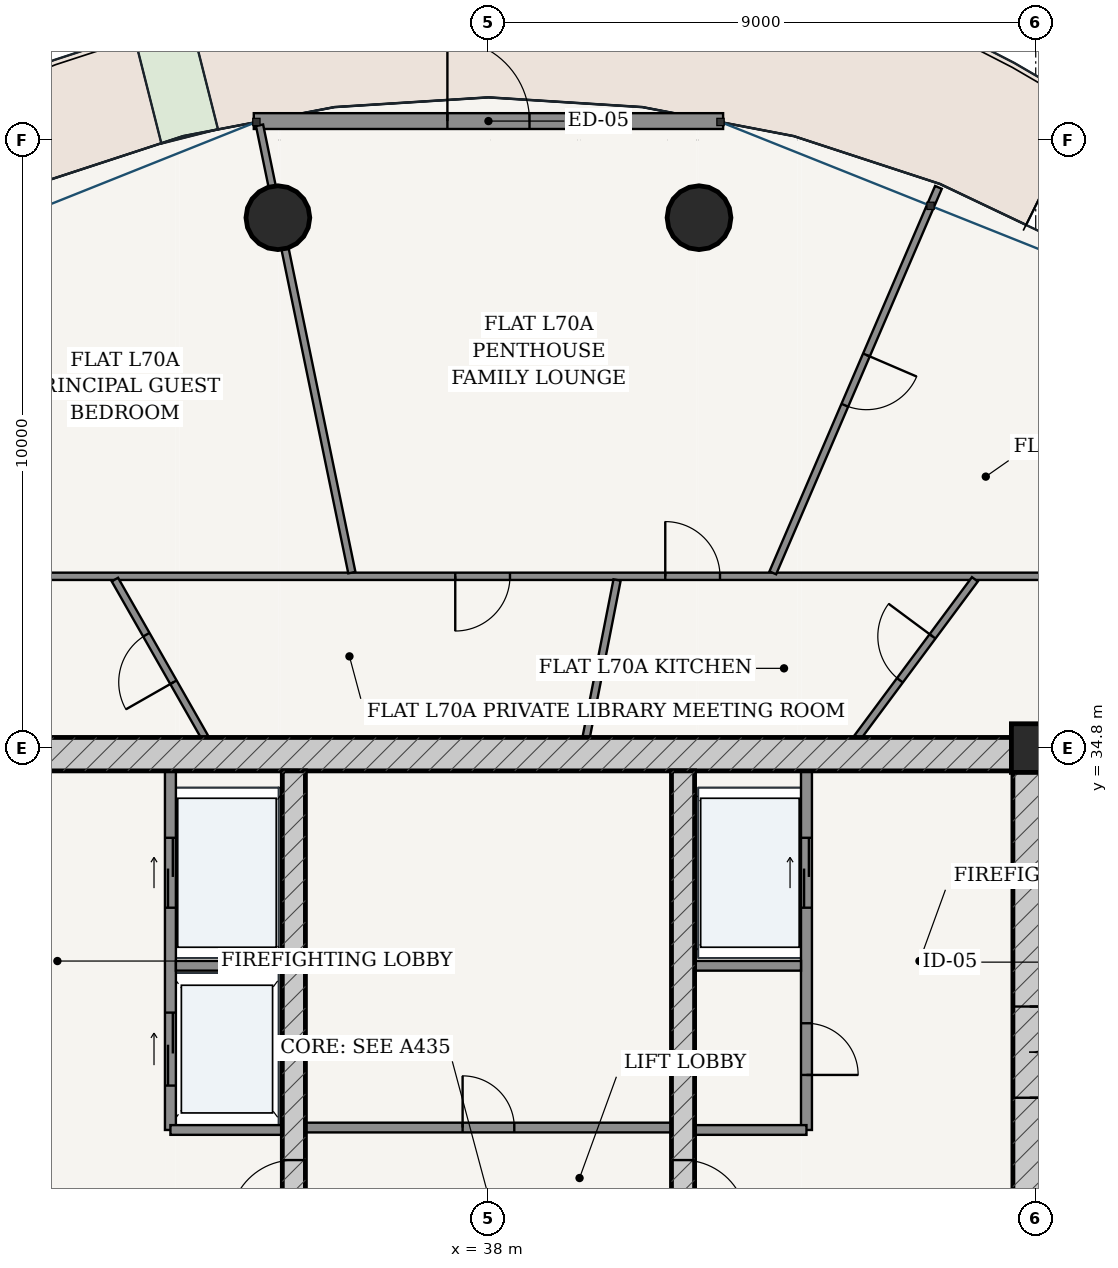
"""IFC4 building model, lengths in metres.
Left out: names, types, materials, properties, quantities, classifications, styles, units other than length and angle.
Written with IfcOpenShell. Run it as: python <this file> out.ifc"""

import sys

from ifc_helpers import new_model, si_unit, direction, frame, frame_2d, origin, origin_2d, place, context, subcontext, project, spatial, rectangle, hollow_circle, extrude, source, transform, mapped, element, fill, save


model = new_model("IFC4")
c1 = context("Model", 3, precision=1e-05, world=origin(), true_north=direction((-0.2419218956, 0.970295726276)))
c2 = subcontext(c1, "Body", "Model", "MODEL_VIEW")
j1 = project(units=[si_unit("LENGTHUNIT", "METRE"), si_unit("PLANEANGLEUNIT", "RADIAN")], contexts=[c1])
p1 = place(None, origin())
s1 = spatial("IfcSite", under=j1, at=p1, CompositionType="ELEMENT")
p2 = place(p1, origin())
s2 = spatial("IfcBuilding", under=s1, at=p2, CompositionType="ELEMENT")
p3 = place(p2, frame((0.0, 0.0, 266.95)))
s3 = spatial("IfcBuildingStorey", under=s2, at=p3, CompositionType="ELEMENT", Elevation=266.95)
p4 = place(p3, frame((47.0, 34.8, 0.0), z_axis=(0.0, 0.0, 1.0), x_axis=(1.0, 0.0, 0.0)))
e1 = element("IfcColumn", 1, at=p4, inside=s3, PredefinedType="COLUMN", context=c2, shape_type="SweptSolid", body=[
    extrude(rectangle(XDim=0.8, YDim=0.8, at=origin_2d()), origin(), (0.0, 0.0, 1.0), 3.75),
])
p5 = place(p3, frame((28.825, 34.7, 0.0), z_axis=(0.0, 0.0, 1.0), x_axis=(1.0, 0.0, 0.0)))
e2 = element("IfcWall", 2, at=p5, inside=s3, PredefinedType="SHEAR", context=c2, shape_type="SweptSolid", body=[
    extrude(rectangle(XDim=18.35, YDim=0.55, at=frame_2d((9.175, 0.0))), origin(), (0.0, 0.0, 1.0), 3.49),
])
p6 = place(p3, frame((46.9, 19.175, 0.0), z_axis=(0.0, 0.0, 1.0), x_axis=(0.0, 1.0, 0.0)))
e3 = element("IfcWall", 3, at=p6, inside=s3, PredefinedType="SHEAR", context=c2, shape_type="SweptSolid", body=[
    extrude(rectangle(XDim=15.25, YDim=0.55, at=frame_2d((7.625, 0.0))), origin(), (0.0, 0.0, 1.0), 3.49),
])
p7 = place(p6, frame((9.875, 0.0, 0.0)))
e4 = element("IfcOpeningElement", 4, at=p7, cuts=e3, PredefinedType="OPENING", context=c2, shape_type="SweptSolid", body=[
    extrude(rectangle(XDim=1.5, YDim=2.2, at=frame_2d((0.75, 1.1))), frame((0.0, 0.285, 0.0), z_axis=(0.0, -1.0, 0.0), x_axis=(1.0, 0.0, 0.0)), (0.0, 0.0, 1.0), 0.57),
])
p8 = place(p3, frame((34.8, 19.175, 0.0), z_axis=(0.0, 0.0, 1.0), x_axis=(0.0, 1.0, 0.0)))
e5 = element("IfcWall", 5, at=p8, inside=s3, PredefinedType="SHEAR", context=c2, shape_type="SweptSolid", body=[
    extrude(rectangle(XDim=15.25, YDim=0.38, at=frame_2d((7.625, 0.0))), origin(), (0.0, 0.0, 1.0), 3.49),
])
p9 = place(p8, frame((7.8, 0.0, 0.0)))
e6 = element("IfcOpeningElement", 6, at=p9, cuts=e5, PredefinedType="OPENING", context=c2, shape_type="SweptSolid", body=[
    extrude(rectangle(XDim=1.05, YDim=2.15, at=frame_2d((0.525, 1.075))), frame((0.0, 0.2, 0.0), z_axis=(0.0, -1.0, 0.0), x_axis=(1.0, 0.0, 0.0)), (0.0, 0.0, 1.0), 0.4),
])
p10 = place(p3, frame((41.2, 19.175, 0.0), z_axis=(0.0, 0.0, 1.0), x_axis=(0.0, 1.0, 0.0)))
e7 = element("IfcWall", 7, at=p10, inside=s3, PredefinedType="SHEAR", context=c2, shape_type="SweptSolid", body=[
    extrude(rectangle(XDim=15.25, YDim=0.38, at=frame_2d((7.625, 0.0))), origin(), (0.0, 0.0, 1.0), 3.49),
])
p11 = place(p10, frame((7.8, 0.0, 0.0)))
e8 = element("IfcOpeningElement", 8, at=p11, cuts=e7, PredefinedType="OPENING", context=c2, shape_type="SweptSolid", body=[
    extrude(rectangle(XDim=1.05, YDim=2.15, at=frame_2d((0.525, 1.075))), frame((0.0, 0.2, 0.0), z_axis=(0.0, -1.0, 0.0), x_axis=(1.0, 0.0, 0.0)), (0.0, 0.0, 1.0), 0.4),
])
for number, where, z_axis, x_axis in (
    (9, (41.463, 43.522, 0.0), (0.0, 0.0, 1.0), (1.0, 0.0, 0.0)),
    (10, (34.537, 43.522, 0.0), (0.0, 0.0, 1.0), (1.0, 0.0, 0.0)),
):
    element("IfcColumn", number, at=place(p3, frame(where, z_axis=z_axis, x_axis=x_axis)), inside=s3, PredefinedType="COLUMN", context=c2, shape_type="SweptSolid", body=[
        extrude(hollow_circle(Radius=0.525, WallThickness=0.035, at=origin_2d()), origin(), (0.0, 0.0, 1.0), 3.75),
    ])
p12 = place(p3, frame((41.859, 45.111, 0.0), z_axis=(0.0, 0.0, 1.0), x_axis=(-1.0, 0.0, 0.0)))
e11 = element("IfcWall", 11, at=p12, inside=s3, PredefinedType="SOLIDWALL", context=c2, shape_type="SweptSolid", body=[
    extrude(rectangle(XDim=7.718, YDim=0.26, at=frame_2d((3.859, 0.0))), origin(), (0.0, 0.0, 1.0), 3.49),
])
p13 = place(p12, frame((3.184, 0.0, 0.0)))
e12 = element("IfcOpeningElement", 12, at=p13, cuts=e11, PredefinedType="OPENING", context=c2, shape_type="SweptSolid", body=[
    extrude(rectangle(XDim=1.35, YDim=2.2, at=frame_2d((0.675, 1.1))), frame((0.0, 0.14, 0.0), z_axis=(0.0, -1.0, 0.0), x_axis=(1.0, 0.0, 0.0)), (0.0, 0.0, 1.0), 0.28),
])
p14 = place(p3, frame((32.77, 28.52, 0.0), z_axis=(0.0, 0.0, 1.0), x_axis=(0.0, 1.0, 0.0)))
e13 = element("IfcWall", 13, at=p14, inside=s3, PredefinedType="PARTITIONING", context=c2, shape_type="SweptSolid", body=[
    extrude(rectangle(XDim=5.905, YDim=0.18, at=frame_2d((2.953, 0.0))), origin(), (0.0, 0.0, 1.0), 3.49),
])
p15 = place(p14, frame((3.655, 0.0, 0.0)))
e14 = element("IfcOpeningElement", 14, at=p15, cuts=e13, PredefinedType="OPENING", context=c2, shape_type="SweptSolid", body=[
    extrude(rectangle(XDim=1.15, YDim=2.2, at=frame_2d((0.575, 1.1))), frame((0.0, 0.1, 0.0), z_axis=(0.0, -1.0, 0.0), x_axis=(1.0, 0.0, 0.0)), (0.0, 0.0, 1.0), 0.2),
])
p16 = place(p14, frame((0.73, 0.0, 0.0)))
e15 = element("IfcOpeningElement", 15, at=p16, cuts=e13, PredefinedType="OPENING", context=c2, shape_type="SweptSolid", body=[
    extrude(rectangle(XDim=1.2, YDim=2.25, at=frame_2d((0.6, 1.125))), frame((0.0, 0.1, 0.0), z_axis=(0.0, -1.0, 0.0), x_axis=(1.0, 0.0, 0.0)), (0.0, 0.0, 1.0), 0.2),
])
p17 = place(p3, frame((32.86, 31.22, 0.0), z_axis=(0.0, 0.0, 1.0), x_axis=(1.0, 0.0, 0.0)))
e16 = element("IfcWall", 16, at=p17, inside=s3, PredefinedType="PARTITIONING", context=c2, shape_type="SweptSolid", body=[
    extrude(rectangle(XDim=1.75, YDim=0.16, at=frame_2d((0.875, 0.0))), origin(), (0.0, 0.0, 1.0), 3.49),
])
p18 = place(p3, frame((32.77, 28.52, 0.0), z_axis=(0.0, 0.0, 1.0), x_axis=(1.0, 0.0, 0.0)))
e17 = element("IfcWall", 17, at=p18, inside=s3, PredefinedType="PARTITIONING", context=c2, shape_type="SweptSolid", body=[
    extrude(rectangle(XDim=1.84, YDim=0.16, at=frame_2d((0.92, 0.0))), origin(), (0.0, 0.0, 1.0), 3.49),
])
p19 = place(p3, frame((43.23, 28.52, 0.0), z_axis=(0.0, 0.0, 1.0), x_axis=(0.0, 1.0, 0.0)))
e18 = element("IfcWall", 18, at=p19, inside=s3, PredefinedType="PARTITIONING", context=c2, shape_type="SweptSolid", body=[
    extrude(rectangle(XDim=5.905, YDim=0.18, at=frame_2d((2.953, 0.0))), origin(), (0.0, 0.0, 1.0), 3.49),
])
p20 = place(p19, frame((0.905, 0.0, 0.0)))
e19 = element("IfcOpeningElement", 19, at=p20, cuts=e18, PredefinedType="OPENING", context=c2, shape_type="SweptSolid", body=[
    extrude(rectangle(XDim=0.85, YDim=2.1, at=frame_2d((0.425, 1.05))), frame((0.0, 0.1, 0.0), z_axis=(0.0, -1.0, 0.0), x_axis=(1.0, 0.0, 0.0)), (0.0, 0.0, 1.0), 0.2),
])
p21 = place(p19, frame((3.655, 0.0, 0.0)))
e20 = element("IfcOpeningElement", 20, at=p21, cuts=e18, PredefinedType="OPENING", context=c2, shape_type="SweptSolid", body=[
    extrude(rectangle(XDim=1.15, YDim=2.2, at=frame_2d((0.575, 1.1))), frame((0.0, 0.1, 0.0), z_axis=(0.0, -1.0, 0.0), x_axis=(1.0, 0.0, 0.0)), (0.0, 0.0, 1.0), 0.2),
])
p22 = place(p3, frame((41.39, 31.22, 0.0), z_axis=(0.0, 0.0, 1.0), x_axis=(1.0, 0.0, 0.0)))
e21 = element("IfcWall", 21, at=p22, inside=s3, PredefinedType="PARTITIONING", context=c2, shape_type="SweptSolid", body=[
    extrude(rectangle(XDim=1.75, YDim=0.16, at=frame_2d((0.875, 0.0))), origin(), (0.0, 0.0, 1.0), 3.49),
])
p23 = place(p3, frame((41.39, 28.52, 0.0), z_axis=(0.0, 0.0, 1.0), x_axis=(1.0, 0.0, 0.0)))
e22 = element("IfcWall", 22, at=p23, inside=s3, PredefinedType="PARTITIONING", context=c2, shape_type="SweptSolid", body=[
    extrude(rectangle(XDim=1.84, YDim=0.16, at=frame_2d((0.92, 0.0))), origin(), (0.0, 0.0, 1.0), 3.49),
])
p24 = place(p3, frame((34.99, 28.56, 0.0), z_axis=(0.0, 0.0, 1.0), x_axis=(1.0, 0.0, 0.0)))
e23 = element("IfcWall", 23, at=p24, inside=s3, PredefinedType="PARTITIONING", context=c2, shape_type="SweptSolid", body=[
    extrude(rectangle(XDim=6.02, YDim=0.16, at=frame_2d((3.01, 0.0))), origin(), (0.0, 0.0, 1.0), 3.49),
])
p25 = place(p24, frame((2.585, 0.0, 0.0)))
e24 = element("IfcOpeningElement", 24, at=p25, cuts=e23, PredefinedType="OPENING", context=c2, shape_type="SweptSolid", body=[
    extrude(rectangle(XDim=0.85, YDim=2.1, at=frame_2d((0.425, 1.05))), frame((0.0, 0.09, 0.0), z_axis=(0.0, -1.0, 0.0), x_axis=(1.0, 0.0, 0.0)), (0.0, 0.0, 1.0), 0.18),
])
p26 = place(p3, frame((26.175, 37.625, 0.0), z_axis=(0.0, 0.0, 1.0), x_axis=(1.0, 0.0, 0.0)))
e25 = element("IfcWall", 25, at=p26, inside=s3, PredefinedType="PARTITIONING", context=c2, shape_type="SweptSolid", body=[
    extrude(rectangle(XDim=23.65, YDim=0.12, at=frame_2d((11.825, 0.0))), origin(), (0.0, 0.0, 1.0), 3.015),
])
p27 = place(p26, frame((14.733, 0.0, 0.0)))
e26 = element("IfcOpeningElement", 26, at=p27, cuts=e25, PredefinedType="OPENING", context=c2, shape_type="SweptSolid", body=[
    extrude(rectangle(XDim=0.9, YDim=2.15, at=frame_2d((0.45, 1.075))), frame((0.0, 0.07, 0.0), z_axis=(0.0, -1.0, 0.0), x_axis=(1.0, 0.0, 0.0)), (0.0, 0.0, 1.0), 0.14),
])
p28 = place(p26, frame((11.279, 0.0, 0.0)))
e27 = element("IfcOpeningElement", 27, at=p28, cuts=e25, PredefinedType="OPENING", context=c2, shape_type="SweptSolid", body=[
    extrude(rectangle(XDim=0.9, YDim=2.15, at=frame_2d((0.45, 1.075))), frame((0.0, 0.07, 0.0), z_axis=(0.0, -1.0, 0.0), x_axis=(1.0, 0.0, 0.0)), (0.0, 0.0, 1.0), 0.14),
])
p29 = place(p26, frame((2.678, 0.0, 0.0)))
e28 = element("IfcOpeningElement", 28, at=p29, cuts=e25, PredefinedType="OPENING", context=c2, shape_type="SweptSolid", body=[
    extrude(rectangle(XDim=0.9, YDim=2.15, at=frame_2d((0.45, 1.075))), frame((0.0, 0.07, 0.0), z_axis=(0.0, -1.0, 0.0), x_axis=(1.0, 0.0, 0.0)), (0.0, 0.0, 1.0), 0.14),
])
p30 = place(p3, frame((42.676, 37.682, 0.0), z_axis=(0.0, 0.0, 1.0), x_axis=(0.394777489933, 0.918776759307, 0.0)))
e29 = element("IfcWall", 29, at=p30, inside=s3, PredefinedType="PARTITIONING", context=c2, shape_type="SweptSolid", body=[
    extrude(rectangle(XDim=6.9, YDim=0.12, at=frame_2d((3.45, 0.0))), origin(), (0.0, 0.0, 1.0), 3.121),
])
p31 = place(p30, frame((3.0, 0.0, 0.0)))
e30 = element("IfcOpeningElement", 30, at=p31, cuts=e29, PredefinedType="OPENING", context=c2, shape_type="SweptSolid", body=[
    extrude(rectangle(XDim=0.9, YDim=2.15, at=frame_2d((0.45, 1.075))), frame((0.0, 0.07, 0.0), z_axis=(0.0, -1.0, 0.0), x_axis=(1.0, 0.0, 0.0)), (0.0, 0.0, 1.0), 0.14),
])
p32 = place(p3, frame((35.754, 37.686, 0.0), z_axis=(0.0, 0.0, 1.0), x_axis=(-0.202105877204, 0.979363678313, 0.0)))
e31 = element("IfcWall", 31, at=p32, inside=s3, PredefinedType="PARTITIONING", context=c2, shape_type="SweptSolid", body=[
    extrude(rectangle(XDim=7.512, YDim=0.12, at=frame_2d((3.756, 0.0))), origin(), (0.0, 0.0, 1.0), 3.015),
])
p33 = place(p3, frame((44.07, 34.977, 0.0), z_axis=(0.0, 0.0, 1.0), x_axis=(0.596033679783, 0.802959433947, 0.0)))
e32 = element("IfcWall", 32, at=p33, inside=s3, PredefinedType="PARTITIONING", context=c2, shape_type="SweptSolid", body=[
    extrude(rectangle(XDim=3.236, YDim=0.12, at=frame_2d((1.618, 0.0))), origin(), (0.0, 0.0, 1.0), 3.49),
])
p34 = place(p33, frame((1.168, 0.0, 0.0)))
e33 = element("IfcOpeningElement", 33, at=p34, cuts=e32, PredefinedType="OPENING", context=c2, shape_type="SweptSolid", body=[
    extrude(rectangle(XDim=0.9, YDim=2.15, at=frame_2d((0.45, 1.075))), frame((0.0, 0.07, 0.0), z_axis=(0.0, -1.0, 0.0), x_axis=(1.0, 0.0, 0.0)), (0.0, 0.0, 1.0), 0.14),
])
p35 = place(p3, frame((39.607, 34.977, 0.0), z_axis=(0.0, 0.0, 1.0), x_axis=(0.192785105701, 0.981241001497, 0.0)))
e34 = element("IfcWall", 34, at=p35, inside=s3, PredefinedType="PARTITIONING", context=c2, shape_type="SweptSolid", body=[
    extrude(rectangle(XDim=2.637, YDim=0.12, at=frame_2d((1.318, 0.0))), origin(), (0.0, 0.0, 1.0), 2.575),
])
p36 = place(p3, frame((33.336, 34.977, 0.0), z_axis=(0.0, 0.0, 1.0), x_axis=(-0.495399243909, 0.868665406894, 0.0)))
e35 = element("IfcWall", 35, at=p36, inside=s3, PredefinedType="PARTITIONING", context=c2, shape_type="SweptSolid", body=[
    extrude(rectangle(XDim=2.987, YDim=0.12, at=frame_2d((1.493, 0.0))), origin(), (0.0, 0.0, 1.0), 3.49),
])
p37 = place(p36, frame((1.043, 0.0, 0.0)))
e36 = element("IfcOpeningElement", 36, at=p37, cuts=e35, PredefinedType="OPENING", context=c2, shape_type="SweptSolid", body=[
    extrude(rectangle(XDim=0.9, YDim=2.15, at=frame_2d((0.45, 1.075))), frame((0.0, 0.07, 0.0), z_axis=(0.0, -1.0, 0.0), x_axis=(1.0, 0.0, 0.0)), (0.0, 0.0, 1.0), 0.14),
])
m1 = source(origin(), c2, "Body", "SweptSolid", [
    extrude(rectangle(XDim=1.35, YDim=2.2, at=frame_2d((0.675, 1.1))), frame((0.0, 0.025, 0.0), z_axis=(0.0, -1.0, 0.0), x_axis=(1.0, 0.0, 0.0)), (0.0, 0.0, 1.0), 0.05),
])
p38 = place(p13, frame((1.35, 0.0, 0.0), z_axis=(0.0, 0.0, 1.0), x_axis=(-1.0, 0.0, 0.0)))
e37 = element("IfcDoor", 37, at=p38, inside=s3, OperationType="SINGLE_SWING_LEFT", PredefinedType="DOOR", context=c2, shape_type="MappedRepresentation", body=[
    mapped(m1, transform((0.0, 0.0, 0.0), scale=1.0)),
])
fill(e12, e37)
m2 = source(origin(), c2, "Body", "SweptSolid", [
    extrude(rectangle(XDim=1.5, YDim=2.2, at=frame_2d((0.75, 1.1))), frame((0.0, 0.025, 0.0), z_axis=(0.0, -1.0, 0.0), x_axis=(1.0, 0.0, 0.0)), (0.0, 0.0, 1.0), 0.05),
])
p39 = place(p7, frame((1.5, 0.0, 0.0), z_axis=(0.0, 0.0, 1.0), x_axis=(-1.0, 0.0, 0.0)))
e38 = element("IfcDoor", 38, at=p39, inside=s3, OperationType="DOUBLE_DOOR_SINGLE_SWING", PredefinedType="DOOR", context=c2, shape_type="MappedRepresentation", body=[
    mapped(m2, transform((0.0, 0.0, 0.0), scale=1.0)),
])
fill(e4, e38)
m3 = source(origin(), c2, "Body", "SweptSolid", [
    extrude(rectangle(XDim=1.05, YDim=2.15, at=frame_2d((0.525, 1.075))), frame((0.0, 0.025, 0.0), z_axis=(0.0, -1.0, 0.0), x_axis=(1.0, 0.0, 0.0)), (0.0, 0.0, 1.0), 0.05),
])
p40 = place(p9, origin())
e39 = element("IfcDoor", 39, at=p40, inside=s3, OperationType="SINGLE_SWING_LEFT", PredefinedType="DOOR", context=c2, shape_type="MappedRepresentation", body=[
    mapped(m3, transform((0.0, 0.0, 0.0), scale=1.0)),
])
fill(e6, e39)
p41 = place(p11, frame((1.05, 0.0, 0.0), z_axis=(0.0, 0.0, 1.0), x_axis=(-1.0, 0.0, 0.0)))
e40 = element("IfcDoor", 40, at=p41, inside=s3, OperationType="SINGLE_SWING_RIGHT", PredefinedType="DOOR", context=c2, shape_type="MappedRepresentation", body=[
    mapped(m3, transform((0.0, 0.0, 0.0), scale=1.0)),
])
fill(e8, e40)
m4 = source(origin(), c2, "Body", "SweptSolid", [
    extrude(rectangle(XDim=0.85, YDim=2.1, at=frame_2d((0.425, 1.05))), frame((0.0, 0.025, 0.0), z_axis=(0.0, -1.0, 0.0), x_axis=(1.0, 0.0, 0.0)), (0.0, 0.0, 1.0), 0.05),
])
p42 = place(p20, frame((0.85, 0.0, 0.0), z_axis=(0.0, 0.0, 1.0), x_axis=(-1.0, 0.0, 0.0)))
e41 = element("IfcDoor", 41, at=p42, inside=s3, OperationType="SINGLE_SWING_RIGHT", PredefinedType="DOOR", context=c2, shape_type="MappedRepresentation", body=[
    mapped(m4, transform((0.0, 0.0, 0.0), scale=1.0)),
])
fill(e19, e41)
p43 = place(p25, origin())
e42 = element("IfcDoor", 42, at=p43, inside=s3, OperationType="SINGLE_SWING_LEFT", PredefinedType="DOOR", context=c2, shape_type="MappedRepresentation", body=[
    mapped(m4, transform((0.0, 0.0, 0.0), scale=1.0)),
])
fill(e24, e42)
m5 = source(origin(), c2, "Body", "SweptSolid", [
    extrude(rectangle(XDim=1.15, YDim=2.2, at=frame_2d((0.575, 1.1))), frame((0.0, 0.025, 0.0), z_axis=(0.0, -1.0, 0.0), x_axis=(1.0, 0.0, 0.0)), (0.0, 0.0, 1.0), 0.05),
])
p44 = place(p15, origin())
e43 = element("IfcDoor", 43, at=p44, inside=s3, OperationType="DOUBLE_DOOR_SLIDING", PredefinedType="DOOR", context=c2, shape_type="MappedRepresentation", body=[
    mapped(m5, transform((0.0, 0.0, 0.0), scale=1.0)),
])
fill(e14, e43)
p45 = place(p21, origin())
e44 = element("IfcDoor", 44, at=p45, inside=s3, OperationType="DOUBLE_DOOR_SLIDING", PredefinedType="DOOR", context=c2, shape_type="MappedRepresentation", body=[
    mapped(m5, transform((0.0, 0.0, 0.0), scale=1.0)),
])
fill(e20, e44)
m6 = source(origin(), c2, "Body", "SweptSolid", [
    extrude(rectangle(XDim=1.2, YDim=2.25, at=frame_2d((0.6, 1.125))), frame((0.0, 0.025, 0.0), z_axis=(0.0, -1.0, 0.0), x_axis=(1.0, 0.0, 0.0)), (0.0, 0.0, 1.0), 0.05),
])
p46 = place(p16, origin())
e45 = element("IfcDoor", 45, at=p46, inside=s3, OperationType="DOUBLE_DOOR_SLIDING", PredefinedType="DOOR", context=c2, shape_type="MappedRepresentation", body=[
    mapped(m6, transform((0.0, 0.0, 0.0), scale=1.0)),
])
fill(e15, e45)
m7 = source(origin(), c2, "Body", "SweptSolid", [
    extrude(rectangle(XDim=0.9, YDim=2.15, at=frame_2d((0.45, 1.075))), frame((0.0, 0.025, 0.0), z_axis=(0.0, -1.0, 0.0), x_axis=(1.0, 0.0, 0.0)), (0.0, 0.0, 1.0), 0.05),
])
p47 = place(p34, origin())
e46 = element("IfcDoor", 46, at=p47, inside=s3, OperationType="SINGLE_SWING_RIGHT", PredefinedType="DOOR", context=c2, shape_type="MappedRepresentation", body=[
    mapped(m7, transform((0.0, 0.0, 0.0), scale=1.0)),
])
fill(e33, e46)
p48 = place(p27, origin())
e47 = element("IfcDoor", 47, at=p48, inside=s3, OperationType="SINGLE_SWING_LEFT", PredefinedType="DOOR", context=c2, shape_type="MappedRepresentation", body=[
    mapped(m7, transform((0.0, 0.0, 0.0), scale=1.0)),
])
fill(e26, e47)
p49 = place(p28, frame((0.9, 0.0, 0.0), z_axis=(0.0, 0.0, 1.0), x_axis=(-1.0, 0.0, 0.0)))
e48 = element("IfcDoor", 48, at=p49, inside=s3, OperationType="SINGLE_SWING_RIGHT", PredefinedType="DOOR", context=c2, shape_type="MappedRepresentation", body=[
    mapped(m7, transform((0.0, 0.0, 0.0), scale=1.0)),
])
fill(e27, e48)
p50 = place(p37, origin())
e49 = element("IfcDoor", 49, at=p50, inside=s3, OperationType="SINGLE_SWING_LEFT", PredefinedType="DOOR", context=c2, shape_type="MappedRepresentation", body=[
    mapped(m7, transform((0.0, 0.0, 0.0), scale=1.0)),
])
fill(e36, e49)
p51 = place(p31, frame((0.9, 0.0, 0.0), z_axis=(0.0, 0.0, 1.0), x_axis=(-1.0, 0.0, 0.0)))
e50 = element("IfcDoor", 50, at=p51, inside=s3, OperationType="SINGLE_SWING_LEFT", PredefinedType="DOOR", context=c2, shape_type="MappedRepresentation", body=[
    mapped(m7, transform((0.0, 0.0, 0.0), scale=1.0)),
])
fill(e30, e50)
save(model, sys.argv[1])
